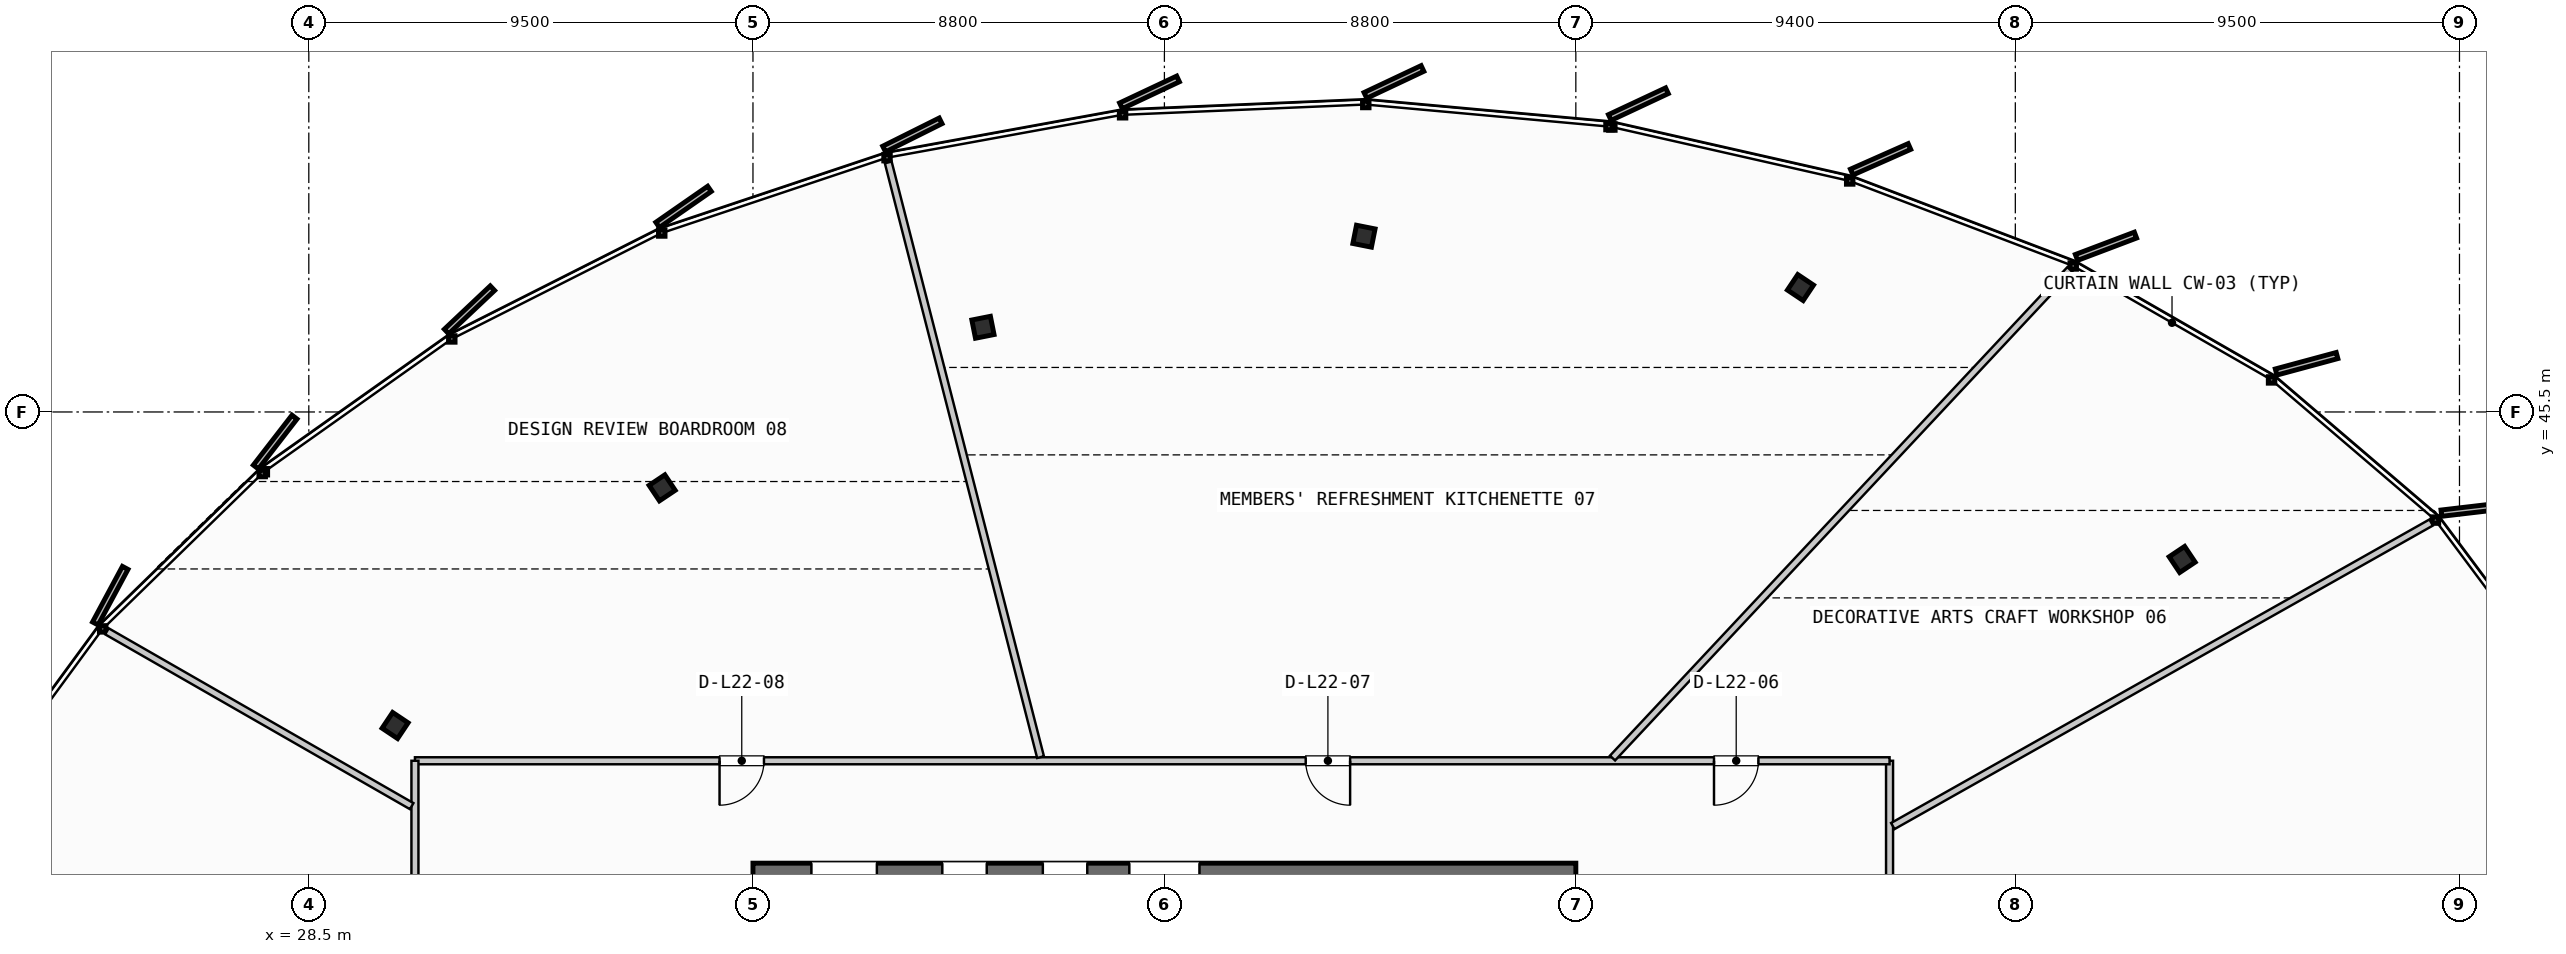
"""IFC4 building model, lengths in metres.
Left out: names, types, materials, properties, quantities, classifications, styles, units other than length and angle.
Written with IfcOpenShell. Run it as: python <this file> out.ifc"""

import sys

from ifc_helpers import new_model, si_unit, direction, frame, frame_2d, origin, origin_2d, place, context, subcontext, project, spatial, rectangle, i_section, extrude, source, transform, mapped, element, fill, save


model = new_model("IFC4")
c1 = context("Model", 3, precision=1e-05, world=origin(), true_north=direction((0.0, 1.0)))
c2 = subcontext(c1, "Body", "Model", "MODEL_VIEW")
j1 = project(units=[si_unit("LENGTHUNIT", "METRE"), si_unit("PLANEANGLEUNIT", "RADIAN")], contexts=[c1])
p1 = place(None, origin())
s1 = spatial("IfcSite", under=j1, at=p1, CompositionType="ELEMENT")
p2 = place(p1, origin())
s2 = spatial("IfcBuilding", under=s1, at=p2, CompositionType="ELEMENT")
p3 = place(p2, frame((0.0, 0.0, 92.8)))
s3 = spatial("IfcBuildingStorey", under=s2, at=p3, CompositionType="ELEMENT", Elevation=92.8)
p4 = place(p3, frame((55.6, 35.5, 0.0), z_axis=(0.0, 0.0, 1.0), x_axis=(-1.0, 0.0, 0.0)))
e1 = element("IfcWall", 1, at=p4, inside=s3, PredefinedType="SHEAR", context=c2, shape_type="SweptSolid", body=[
    extrude(rectangle(XDim=17.6, YDim=0.7, at=frame_2d((8.8, 0.0))), origin(), (0.0, 0.0, 1.0), 3.35),
])
p5 = place(p4, frame((8.05, 0.0, 0.0)))
e2 = element("IfcOpeningElement", 2, at=p5, cuts=e1, PredefinedType="OPENING", context=c2, shape_type="SweptSolid", body=[
    extrude(rectangle(XDim=1.5, YDim=2.2, at=frame_2d((0.75, 1.1))), frame((0.0, 0.36, 0.0), z_axis=(0.0, -1.0, 0.0), x_axis=(1.0, 0.0, 0.0)), (0.0, 0.0, 1.0), 0.72),
])
p6 = place(p4, frame((14.95, 0.0, 0.0)))
e3 = element("IfcOpeningElement", 3, at=p6, cuts=e1, PredefinedType="OPENING", context=c2, shape_type="SweptSolid", body=[
    extrude(rectangle(XDim=1.4, YDim=2.3, at=frame_2d((0.7, 1.15))), frame((0.0, 0.36, 0.0), z_axis=(0.0, -1.0, 0.0), x_axis=(1.0, 0.0, 0.0)), (0.0, 0.0, 1.0), 0.72),
])
p7 = place(p4, frame((12.6, 0.0, 0.0)))
e4 = element("IfcOpeningElement", 4, at=p7, cuts=e1, PredefinedType="OPENING", context=c2, shape_type="SweptSolid", body=[
    extrude(rectangle(XDim=0.95, YDim=2.15, at=frame_2d((0.475, 1.075))), frame((0.0, 0.36, 0.0), z_axis=(0.0, -1.0, 0.0), x_axis=(1.0, 0.0, 0.0)), (0.0, 0.0, 1.0), 0.72),
])
p8 = place(p4, frame((10.45, 0.0, 0.0)))
e5 = element("IfcOpeningElement", 5, at=p8, cuts=e1, PredefinedType="OPENING", context=c2, shape_type="SweptSolid", body=[
    extrude(rectangle(XDim=0.95, YDim=2.15, at=frame_2d((0.475, 1.075))), frame((0.0, 0.36, 0.0), z_axis=(0.0, -1.0, 0.0), x_axis=(1.0, 0.0, 0.0)), (0.0, 0.0, 1.0), 0.72),
])
m1 = source(origin(), c2, "Body", "SweptSolid", [
    extrude(i_section(OverallWidth=0.405, OverallDepth=0.398, WebThickness=0.035, FlangeThickness=0.056, FilletRadius=0.015, at=origin_2d()), origin(), (0.0, 0.0, 1.0), 3.35),
])
for number, where, z_axis, x_axis in (
    (6, (68.569, 42.345, 0.0), (0.0, 0.0, 1.0), (0.831, 0.556, 0.0)),
    (7, (60.405, 48.161, 0.0), (0.0, 0.0, 1.0), (0.556, 0.831, 0.0)),
    (8, (51.069, 49.259, 0.0), (0.0, 0.0, 1.0), (0.195, 0.981, 0.0)),
    (9, (42.919, 47.311, 0.0), (0.0, 0.0, 1.0), (-0.195, 0.981, 0.0)),
    (10, (36.058, 43.877, 0.0), (0.0, 0.0, 1.0), (-0.556, 0.831, 0.0)),
    (11, (30.346, 38.794, 0.0), (0.0, 0.0, 1.0), (-0.831, 0.556, 0.0)),
):
    element("IfcColumn", number, at=place(p3, frame(where, z_axis=z_axis, x_axis=x_axis)), inside=s3, PredefinedType="COLUMN", context=c2, shape_type="MappedRepresentation", body=[
        mapped(m1, transform((0.0, 0.0, 0.0), scale=1.0)),
    ])
p9 = place(p3, frame((62.31, 17.98, 0.0), z_axis=(0.0, 0.0, 1.0), x_axis=(0.0, 1.0, 0.0)))
e12 = element("IfcWall", 12, at=p9, inside=s3, PredefinedType="PARTITIONING", context=c2, shape_type="SweptSolid", body=[
    extrude(rectangle(XDim=20.06, YDim=0.15, at=frame_2d((10.03, 0.0))), origin(), (0.0, 0.0, 1.0), 2.28),
])
p10 = place(p9, frame((5.033, 0.0, 0.0)))
e13 = element("IfcOpeningElement", 13, at=p10, cuts=e12, PredefinedType="OPENING", context=c2, shape_type="SweptSolid", body=[
    extrude(rectangle(XDim=0.95, YDim=2.15, at=frame_2d((0.475, 1.075))), frame((0.0, 0.085, 0.0), z_axis=(0.0, -1.0, 0.0), x_axis=(1.0, 0.0, 0.0)), (0.0, 0.0, 1.0), 0.17),
])
p11 = place(p9, frame((13.662, 0.0, 0.0)))
e14 = element("IfcOpeningElement", 14, at=p11, cuts=e12, PredefinedType="OPENING", context=c2, shape_type="SweptSolid", body=[
    extrude(rectangle(XDim=0.95, YDim=2.15, at=frame_2d((0.475, 1.075))), frame((0.0, 0.085, 0.0), z_axis=(0.0, -1.0, 0.0), x_axis=(1.0, 0.0, 0.0)), (0.0, 0.0, 1.0), 0.17),
])
p12 = place(p3, frame((62.31, 38.04, 0.0), z_axis=(0.0, 0.0, 1.0), x_axis=(-1.0, 0.0, 0.0)))
e15 = element("IfcWall", 15, at=p12, inside=s3, PredefinedType="PARTITIONING", context=c2, shape_type="SweptSolid", body=[
    extrude(rectangle(XDim=31.54, YDim=0.15, at=frame_2d((15.77, 0.0))), origin(), (0.0, 0.0, 1.0), 2.28),
])
p13 = place(p12, frame((2.805, 0.0, 0.0)))
e16 = element("IfcOpeningElement", 16, at=p13, cuts=e15, PredefinedType="OPENING", context=c2, shape_type="SweptSolid", body=[
    extrude(rectangle(XDim=0.95, YDim=2.15, at=frame_2d((0.475, 1.075))), frame((0.0, 0.085, 0.0), z_axis=(0.0, -1.0, 0.0), x_axis=(1.0, 0.0, 0.0)), (0.0, 0.0, 1.0), 0.17),
])
p14 = place(p12, frame((11.538, 0.0, 0.0)))
e17 = element("IfcOpeningElement", 17, at=p14, cuts=e15, PredefinedType="OPENING", context=c2, shape_type="SweptSolid", body=[
    extrude(rectangle(XDim=0.95, YDim=2.15, at=frame_2d((0.475, 1.075))), frame((0.0, 0.085, 0.0), z_axis=(0.0, -1.0, 0.0), x_axis=(1.0, 0.0, 0.0)), (0.0, 0.0, 1.0), 0.17),
])
p15 = place(p12, frame((24.075, 0.0, 0.0)))
e18 = element("IfcOpeningElement", 18, at=p15, cuts=e15, PredefinedType="OPENING", context=c2, shape_type="SweptSolid", body=[
    extrude(rectangle(XDim=0.95, YDim=2.15, at=frame_2d((0.475, 1.075))), frame((0.0, 0.085, 0.0), z_axis=(0.0, -1.0, 0.0), x_axis=(1.0, 0.0, 0.0)), (0.0, 0.0, 1.0), 0.17),
])
p16 = place(p3, frame((30.77, 38.04, 0.0), z_axis=(0.0, 0.0, 1.0), x_axis=(0.0, -1.0, 0.0)))
e19 = element("IfcWall", 19, at=p16, inside=s3, PredefinedType="PARTITIONING", context=c2, shape_type="SweptSolid", body=[
    extrude(rectangle(XDim=20.06, YDim=0.15, at=frame_2d((10.03, 0.0))), origin(), (0.0, 0.0, 1.0), 2.28),
])
p17 = place(p16, frame((9.749, 0.0, 0.0)))
e20 = element("IfcOpeningElement", 20, at=p17, cuts=e19, PredefinedType="OPENING", context=c2, shape_type="SweptSolid", body=[
    extrude(rectangle(XDim=0.95, YDim=2.15, at=frame_2d((0.475, 1.075))), frame((0.0, 0.085, 0.0), z_axis=(0.0, -1.0, 0.0), x_axis=(1.0, 0.0, 0.0)), (0.0, 0.0, 1.0), 0.17),
])
p18 = place(p3, frame((62.38, 36.644, 0.0), z_axis=(0.0, 0.0, 1.0), x_axis=(0.871087274925, 0.491128251543, 0.0)))
e21 = element("IfcWall", 21, at=p18, inside=s3, PredefinedType="PARTITIONING", context=c2, shape_type="SweptSolid", body=[
    extrude(rectangle(XDim=13.219, YDim=0.15, at=frame_2d((6.609, 0.0))), origin(), (0.0, 0.0, 1.0), 2.28),
])
p19 = place(p3, frame((56.385, 38.098, 0.0), z_axis=(0.0, 0.0, 1.0), x_axis=(0.683464906362, 0.729983370887, 0.0)))
e22 = element("IfcWall", 22, at=p19, inside=s3, PredefinedType="PARTITIONING", context=c2, shape_type="SweptSolid", body=[
    extrude(rectangle(XDim=14.312, YDim=0.15, at=frame_2d((7.156, 0.0))), origin(), (0.0, 0.0, 1.0), 2.28),
])
p20 = place(p3, frame((44.151, 38.117, 0.0), z_axis=(0.0, 0.0, 1.0), x_axis=(-0.248096639945, 0.9687352875, 0.0)))
e23 = element("IfcWall", 23, at=p20, inside=s3, PredefinedType="PARTITIONING", context=c2, shape_type="SweptSolid", body=[
    extrude(rectangle(XDim=13.13, YDim=0.15, at=frame_2d((6.565, 0.0))), origin(), (0.0, 0.0, 1.0), 2.28),
])
p21 = place(p3, frame((30.701, 37.07, 0.0), z_axis=(0.0, 0.0, 1.0), x_axis=(-0.86743826156, 0.497544834545, 0.0)))
e24 = element("IfcWall", 24, at=p21, inside=s3, PredefinedType="PARTITIONING", context=c2, shape_type="SweptSolid", body=[
    extrude(rectangle(XDim=7.514, YDim=0.15, at=frame_2d((3.757, 0.0))), origin(), (0.0, 0.0, 1.0), 2.28),
])
m2 = source(origin(), c2, "Body", "SweptSolid", [
    extrude(rectangle(XDim=0.95, YDim=2.15, at=frame_2d((0.475, 1.075))), frame((0.0, 0.025, 0.0), z_axis=(0.0, -1.0, 0.0), x_axis=(1.0, 0.0, 0.0)), (0.0, 0.0, 1.0), 0.05),
])
p22 = place(p13, origin())
e25 = element("IfcDoor", 25, at=p22, inside=s3, OperationType="SINGLE_SWING_RIGHT", PredefinedType="DOOR", context=c2, shape_type="MappedRepresentation", body=[
    mapped(m2, transform((0.0, 0.0, 0.0), scale=1.0)),
])
fill(e16, e25)
p23 = place(p14, origin())
e26 = element("IfcDoor", 26, at=p23, inside=s3, OperationType="SINGLE_SWING_LEFT", PredefinedType="DOOR", context=c2, shape_type="MappedRepresentation", body=[
    mapped(m2, transform((0.0, 0.0, 0.0), scale=1.0)),
])
fill(e17, e26)
p24 = place(p15, origin())
e27 = element("IfcDoor", 27, at=p24, inside=s3, OperationType="SINGLE_SWING_RIGHT", PredefinedType="DOOR", context=c2, shape_type="MappedRepresentation", body=[
    mapped(m2, transform((0.0, 0.0, 0.0), scale=1.0)),
])
fill(e18, e27)
save(model, sys.argv[1])
